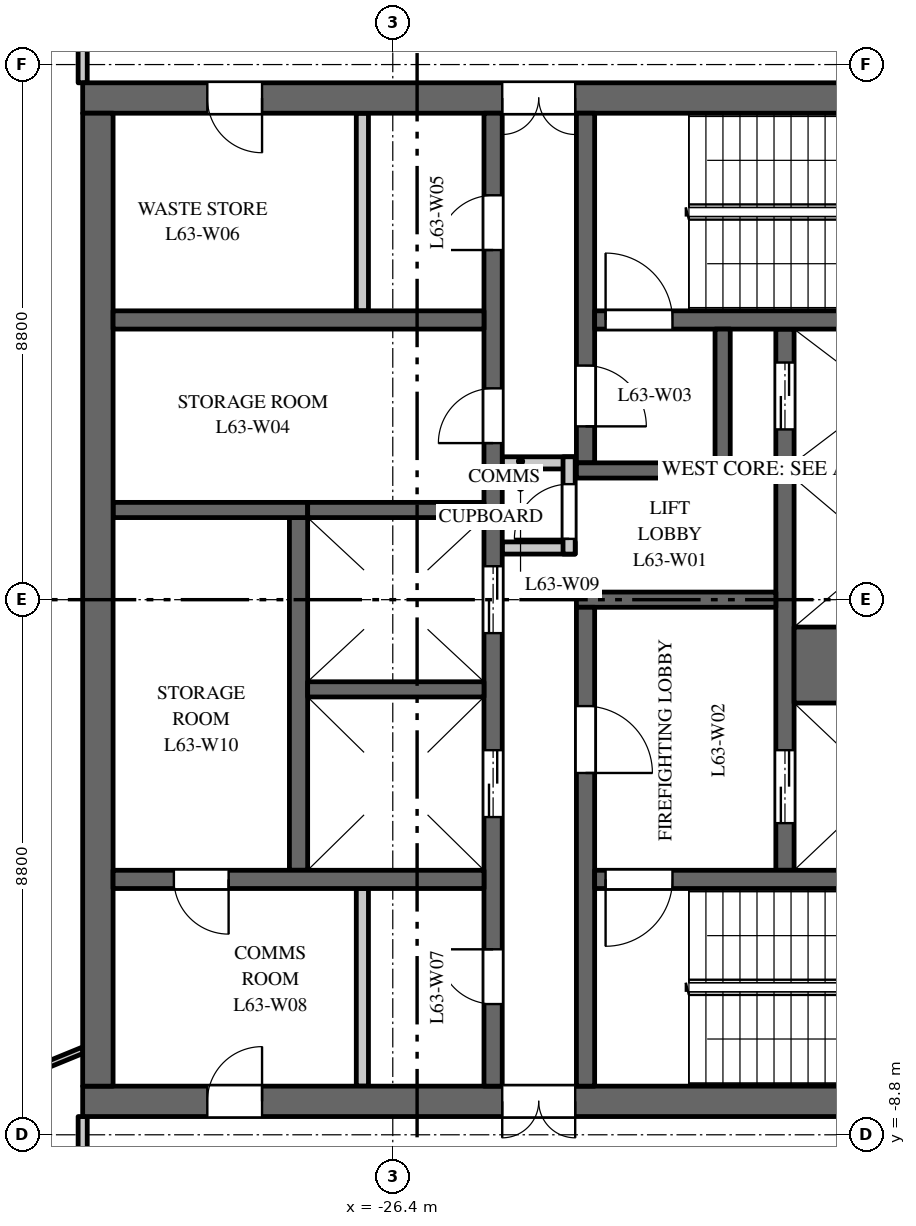
"""IFC4 building model, lengths in metres.
Left out: names, types, materials, properties, quantities, classifications, styles, units other than length and angle.
Written with IfcOpenShell. Run it as: python <this file> out.ifc"""

import sys

from ifc_helpers import new_model, si_unit, direction, frame, frame_2d, origin, place, context, subcontext, project, spatial, rectangle, extrude, element, fill, save


model = new_model("IFC4")
c1 = context("Model", 3, precision=1e-05, world=origin(), true_north=direction((0.0, 1.0)))
c2 = subcontext(c1, "Body", "Model", "MODEL_VIEW")
j1 = project(units=[si_unit("LENGTHUNIT", "METRE"), si_unit("PLANEANGLEUNIT", "RADIAN")], contexts=[c1])
p1 = place(None, origin())
s1 = spatial("IfcSite", under=j1, at=p1, CompositionType="ELEMENT")
p2 = place(p1, origin())
s2 = spatial("IfcBuilding", under=s1, at=p2, CompositionType="ELEMENT")
p3 = place(p2, frame((0.0, 0.0, 295.0)))
s3 = spatial("IfcBuildingStorey", under=s2, at=p3, CompositionType="ELEMENT", Elevation=295.0)
p4 = place(p3, frame((-16.5, 8.25, 0.0), z_axis=(0.0, 0.0, 1.0), x_axis=(-1.0, 0.0, 0.0)))
e1 = element("IfcWall", 1, at=p4, inside=s3, PredefinedType="SHEAR", context=c2, shape_type="SweptSolid", body=[
    extrude(rectangle(XDim=15.0, YDim=0.5, at=frame_2d((7.5, 0.0))), origin(), (0.0, 0.0, 1.0), 3.7),
])
p5 = place(p4, frame((6.9, 0.0, 0.0)))
e2 = element("IfcOpeningElement", 2, at=p5, cuts=e1, PredefinedType="OPENING", context=c2, shape_type="SweptSolid", body=[
    extrude(rectangle(XDim=1.2, YDim=2.1, at=frame_2d((0.6, 1.05))), frame((0.0, 0.26, 0.0), z_axis=(0.0, -1.0, 0.0), x_axis=(1.0, 0.0, 0.0)), (0.0, 0.0, 1.0), 0.52),
])
p6 = place(p4, frame((12.05, 0.0, 0.0)))
e3 = element("IfcOpeningElement", 3, at=p6, cuts=e1, PredefinedType="OPENING", context=c2, shape_type="SweptSolid", body=[
    extrude(rectangle(XDim=0.9, YDim=2.1, at=frame_2d((0.45, 1.05))), frame((0.0, 0.26, 0.0), z_axis=(0.0, -1.0, 0.0), x_axis=(1.0, 0.0, 0.0)), (0.0, 0.0, 1.0), 0.52),
])
p7 = place(p3, frame((-16.5, -8.25, 0.0), z_axis=(0.0, 0.0, 1.0), x_axis=(-1.0, 0.0, 0.0)))
e4 = element("IfcWall", 4, at=p7, inside=s3, PredefinedType="SHEAR", context=c2, shape_type="SweptSolid", body=[
    extrude(rectangle(XDim=15.0, YDim=0.5, at=frame_2d((7.5, 0.0))), origin(), (0.0, 0.0, 1.0), 3.7),
])
p8 = place(p7, frame((6.9, 0.0, 0.0)))
e5 = element("IfcOpeningElement", 5, at=p8, cuts=e4, PredefinedType="OPENING", context=c2, shape_type="SweptSolid", body=[
    extrude(rectangle(XDim=1.2, YDim=2.1, at=frame_2d((0.6, 1.05))), frame((0.0, 0.26, 0.0), z_axis=(0.0, -1.0, 0.0), x_axis=(1.0, 0.0, 0.0)), (0.0, 0.0, 1.0), 0.52),
])
p9 = place(p7, frame((12.05, 0.0, 0.0)))
e6 = element("IfcOpeningElement", 6, at=p9, cuts=e4, PredefinedType="OPENING", context=c2, shape_type="SweptSolid", body=[
    extrude(rectangle(XDim=0.9, YDim=2.1, at=frame_2d((0.45, 1.05))), frame((0.0, 0.26, 0.0), z_axis=(0.0, -1.0, 0.0), x_axis=(1.0, 0.0, 0.0)), (0.0, 0.0, 1.0), 0.52),
])
p10 = place(p3, frame((-27.95, -4.45, 0.0), z_axis=(0.0, 0.0, 1.0), x_axis=(0.0, 1.0, 0.0)))
e7 = element("IfcWall", 7, at=p10, inside=s3, PredefinedType="SHEAR", context=c2, shape_type="SweptSolid", body=[
    extrude(rectangle(XDim=5.8, YDim=0.3, at=frame_2d((2.9, 0.0))), origin(), (0.0, 0.0, 1.0), 3.7),
])
p11 = place(p3, frame((-27.8, 1.475, 0.0), z_axis=(0.0, 0.0, 1.0), x_axis=(-1.0, 0.0, 0.0)))
e8 = element("IfcWall", 8, at=p11, inside=s3, PredefinedType="SHEAR", context=c2, shape_type="SweptSolid", body=[
    extrude(rectangle(XDim=3.2, YDim=0.25, at=frame_2d((1.6, 0.0))), origin(), (0.0, 0.0, 1.0), 3.7),
])
p12 = place(p3, frame((-19.95, -4.45, 0.0), z_axis=(0.0, 0.0, 1.0), x_axis=(0.0, 1.0, 0.0)))
e9 = element("IfcWall", 9, at=p12, inside=s3, PredefinedType="SHEAR", context=c2, shape_type="SweptSolid", body=[
    extrude(rectangle(XDim=8.9, YDim=0.3, at=frame_2d((4.45, 0.0))), origin(), (0.0, 0.0, 1.0), 3.7),
])
p13 = place(p12, frame((0.775, 0.0, 0.0)))
e10 = element("IfcOpeningElement", 10, at=p13, cuts=e9, PredefinedType="OPENING", context=c2, shape_type="SweptSolid", body=[
    extrude(rectangle(XDim=1.2, YDim=2.1, at=frame_2d((0.6, 1.05))), frame((0.0, 0.16, 0.0), z_axis=(0.0, -1.0, 0.0), x_axis=(1.0, 0.0, 0.0)), (0.0, 0.0, 1.0), 0.32),
])
p14 = place(p12, frame((7.25, 0.0, 0.0)))
e11 = element("IfcOpeningElement", 11, at=p14, cuts=e9, PredefinedType="OPENING", context=c2, shape_type="SweptSolid", body=[
    extrude(rectangle(XDim=1.1, YDim=2.1, at=frame_2d((0.55, 1.05))), frame((0.0, 0.16, 0.0), z_axis=(0.0, -1.0, 0.0), x_axis=(1.0, 0.0, 0.0)), (0.0, 0.0, 1.0), 0.32),
])
p15 = place(p3, frame((-24.75, -8.0, 0.0), z_axis=(0.0, 0.0, 1.0), x_axis=(0.0, 1.0, 0.0)))
e12 = element("IfcWall", 12, at=p15, inside=s3, PredefinedType="SHEAR", context=c2, shape_type="SweptSolid", body=[
    extrude(rectangle(XDim=16.0, YDim=0.3, at=frame_2d((8.0, 0.0))), origin(), (0.0, 0.0, 1.0), 3.7),
])
p16 = place(p15, frame((4.425, 0.0, 0.0)))
e13 = element("IfcOpeningElement", 13, at=p16, cuts=e12, PredefinedType="OPENING", context=c2, shape_type="SweptSolid", body=[
    extrude(rectangle(XDim=1.1, YDim=2.1, at=frame_2d((0.55, 1.05))), frame((0.0, 0.16, 0.0), z_axis=(0.0, -1.0, 0.0), x_axis=(1.0, 0.0, 0.0)), (0.0, 0.0, 1.0), 0.32),
])
p17 = place(p15, frame((7.45, 0.0, 0.0)))
e14 = element("IfcOpeningElement", 14, at=p17, cuts=e12, PredefinedType="OPENING", context=c2, shape_type="SweptSolid", body=[
    extrude(rectangle(XDim=1.1, YDim=2.1, at=frame_2d((0.55, 1.05))), frame((0.0, 0.16, 0.0), z_axis=(0.0, -1.0, 0.0), x_axis=(1.0, 0.0, 0.0)), (0.0, 0.0, 1.0), 0.32),
])
p18 = place(p15, frame((10.575, 0.0, 0.0)))
e15 = element("IfcOpeningElement", 15, at=p18, cuts=e12, PredefinedType="OPENING", context=c2, shape_type="SweptSolid", body=[
    extrude(rectangle(XDim=0.9, YDim=2.1, at=frame_2d((0.45, 1.05))), frame((0.0, 0.16, 0.0), z_axis=(0.0, -1.0, 0.0), x_axis=(1.0, 0.0, 0.0)), (0.0, 0.0, 1.0), 0.32),
])
p19 = place(p15, frame((13.75, 0.0, 0.0)))
e16 = element("IfcOpeningElement", 16, at=p19, cuts=e12, PredefinedType="OPENING", context=c2, shape_type="SweptSolid", body=[
    extrude(rectangle(XDim=0.9, YDim=2.1, at=frame_2d((0.45, 1.05))), frame((0.0, 0.16, 0.0), z_axis=(0.0, -1.0, 0.0), x_axis=(1.0, 0.0, 0.0)), (0.0, 0.0, 1.0), 0.32),
])
p20 = place(p15, frame((1.35, 0.0, 0.0)))
e17 = element("IfcOpeningElement", 17, at=p20, cuts=e12, PredefinedType="OPENING", context=c2, shape_type="SweptSolid", body=[
    extrude(rectangle(XDim=0.9, YDim=2.1, at=frame_2d((0.45, 1.05))), frame((0.0, 0.16, 0.0), z_axis=(0.0, -1.0, 0.0), x_axis=(1.0, 0.0, 0.0)), (0.0, 0.0, 1.0), 0.32),
])
p21 = place(p3, frame((-20.1, 0.0, 0.0), z_axis=(0.0, 0.0, 1.0), x_axis=(-1.0, 0.0, 0.0)))
e18 = element("IfcWall", 18, at=p21, inside=s3, PredefinedType="SHEAR", context=c2, shape_type="SweptSolid", body=[
    extrude(rectangle(XDim=3.28, YDim=0.25, at=frame_2d((1.64, 0.0))), origin(), (0.0, 0.0, 1.0), 3.7),
])
for number, where, z_axis, x_axis in (
    (19, (-23.4, 0.85, 0.0), (0.0, 0.0, 1.0), (-1.0, 0.0, 0.0)),
    (20, (-23.4, 2.25, 0.0), (0.0, 0.0, 1.0), (-1.0, 0.0, 0.0)),
):
    element("IfcWall", number, at=place(p3, frame(where, z_axis=z_axis, x_axis=x_axis)), inside=s3, PredefinedType="PARTITIONING", context=c2, shape_type="SweptSolid", body=[
        extrude(rectangle(XDim=1.2, YDim=0.2, at=frame_2d((0.6, 0.0))), origin(), (0.0, 0.0, 1.0), 3.7),
    ])
p22 = place(p3, frame((-23.5, 0.75, 0.0), z_axis=(0.0, 0.0, 1.0), x_axis=(0.0, 1.0, 0.0)))
e21 = element("IfcWall", 21, at=p22, inside=s3, PredefinedType="PARTITIONING", context=c2, shape_type="SweptSolid", body=[
    extrude(rectangle(XDim=1.6, YDim=0.2, at=frame_2d((0.8, 0.0))), origin(), (0.0, 0.0, 1.0), 3.7),
])
p23 = place(p22, frame((0.25, 0.0, 0.0)))
e22 = element("IfcOpeningElement", 22, at=p23, cuts=e21, PredefinedType="OPENING", context=c2, shape_type="SweptSolid", body=[
    extrude(rectangle(XDim=0.9, YDim=2.1, at=frame_2d((0.45, 1.05))), frame((0.0, 0.11, 0.0), z_axis=(0.0, -1.0, 0.0), x_axis=(1.0, 0.0, 0.0)), (0.0, 0.0, 1.0), 0.22),
])
p24 = place(p3, frame((-31.25, -8.0, 0.0), z_axis=(0.0, 0.0, 1.0), x_axis=(0.0, 1.0, 0.0)))
e23 = element("IfcWall", 23, at=p24, inside=s3, PredefinedType="SHEAR", context=c2, shape_type="SweptSolid", body=[
    extrude(rectangle(XDim=16.0, YDim=0.5, at=frame_2d((8.0, 0.0))), origin(), (0.0, 0.0, 1.0), 3.7),
])
p25 = place(p3, frame((-24.9, 4.6, 0.0), z_axis=(0.0, 0.0, 1.0), x_axis=(-1.0, 0.0, 0.0)))
e24 = element("IfcWall", 24, at=p25, inside=s3, PredefinedType="SHEAR", context=c2, shape_type="SweptSolid", body=[
    extrude(rectangle(XDim=6.1, YDim=0.3, at=frame_2d((3.05, 0.0))), origin(), (0.0, 0.0, 1.0), 3.7),
])
for number, where, z_axis, x_axis in (
    (25, (-26.9, 4.75, 0.0), (0.0, 0.0, 1.0), (0.0, 1.0, 0.0)),
    (26, (-26.9, -8.0, 0.0), (0.0, 0.0, 1.0), (0.0, 1.0, 0.0)),
):
    element("IfcWall", number, at=place(p3, frame(where, z_axis=z_axis, x_axis=x_axis)), inside=s3, PredefinedType="PARTITIONING", context=c2, shape_type="SweptSolid", body=[
        extrude(rectangle(XDim=3.25, YDim=0.2, at=frame_2d((1.625, 0.0))), origin(), (0.0, 0.0, 1.0), 3.7),
    ])
p26 = place(p3, frame((-24.9, -4.6, 0.0), z_axis=(0.0, 0.0, 1.0), x_axis=(-1.0, 0.0, 0.0)))
e27 = element("IfcWall", 27, at=p26, inside=s3, PredefinedType="SHEAR", context=c2, shape_type="SweptSolid", body=[
    extrude(rectangle(XDim=6.1, YDim=0.3, at=frame_2d((3.05, 0.0))), origin(), (0.0, 0.0, 1.0), 3.7),
])
p27 = place(p26, frame((4.2, 0.0, 0.0)))
e28 = element("IfcOpeningElement", 28, at=p27, cuts=e27, PredefinedType="OPENING", context=c2, shape_type="SweptSolid", body=[
    extrude(rectangle(XDim=0.9, YDim=2.1, at=frame_2d((0.45, 1.05))), frame((0.0, 0.16, 0.0), z_axis=(0.0, -1.0, 0.0), x_axis=(1.0, 0.0, 0.0)), (0.0, 0.0, 1.0), 0.32),
])
p28 = place(p3, frame((-16.9, -1.075, 0.0), z_axis=(0.0, 0.0, 1.0), x_axis=(-1.0, 0.0, 0.0)))
e29 = element("IfcWall", 29, at=p28, inside=s3, PredefinedType="SHEAR", context=c2, shape_type="SweptSolid", body=[
    extrude(rectangle(XDim=2.9, YDim=1.25, at=frame_2d((1.45, 0.0))), origin(), (0.0, 0.0, 1.0), 3.7),
])
for number, where, z_axis, x_axis in (
    (30, (-16.9, 2.125, 0.0), (0.0, 0.0, 1.0), (-1.0, 0.0, 0.0)),
    (31, (-24.9, -1.475, 0.0), (0.0, 0.0, 1.0), (-1.0, 0.0, 0.0)),
    (32, (-24.9, 1.475, 0.0), (0.0, 0.0, 1.0), (-1.0, 0.0, 0.0)),
):
    element("IfcWall", number, at=place(p3, frame(where, z_axis=z_axis, x_axis=x_axis)), inside=s3, PredefinedType="SHEAR", context=c2, shape_type="SweptSolid", body=[
        extrude(rectangle(XDim=2.9, YDim=0.25, at=frame_2d((1.45, 0.0))), origin(), (0.0, 0.0, 1.0), 3.7),
    ])
p29 = place(p3, frame((-23.23, 2.25, 0.0), z_axis=(0.0, 0.0, 1.0), x_axis=(0.0, 1.0, 0.0)))
e33 = element("IfcWall", 33, at=p29, inside=s3, PredefinedType="SHEAR", context=c2, shape_type="SweptSolid", body=[
    extrude(rectangle(XDim=5.75, YDim=0.3, at=frame_2d((2.875, 0.0))), origin(), (0.0, 0.0, 1.0), 3.7),
])
p30 = place(p29, frame((0.6, 0.0, 0.0)))
e34 = element("IfcOpeningElement", 34, at=p30, cuts=e33, PredefinedType="OPENING", context=c2, shape_type="SweptSolid", body=[
    extrude(rectangle(XDim=1.0, YDim=2.1, at=frame_2d((0.5, 1.05))), frame((0.0, 0.16, 0.0), z_axis=(0.0, -1.0, 0.0), x_axis=(1.0, 0.0, 0.0)), (0.0, 0.0, 1.0), 0.32),
])
p31 = place(p3, frame((-23.23, -8.0, 0.0), z_axis=(0.0, 0.0, 1.0), x_axis=(0.0, 1.0, 0.0)))
e35 = element("IfcWall", 35, at=p31, inside=s3, PredefinedType="SHEAR", context=c2, shape_type="SweptSolid", body=[
    extrude(rectangle(XDim=7.875, YDim=0.3, at=frame_2d((3.938, 0.0))), origin(), (0.0, 0.0, 1.0), 3.7),
])
p32 = place(p31, frame((5.15, 0.0, 0.0)))
e36 = element("IfcOpeningElement", 36, at=p32, cuts=e35, PredefinedType="OPENING", context=c2, shape_type="SweptSolid", body=[
    extrude(rectangle(XDim=1.1, YDim=2.1, at=frame_2d((0.55, 1.05))), frame((0.0, 0.16, 0.0), z_axis=(0.0, -1.0, 0.0), x_axis=(1.0, 0.0, 0.0)), (0.0, 0.0, 1.0), 0.32),
])
p33 = place(p3, frame((-16.9, 4.6, 0.0), z_axis=(0.0, 0.0, 1.0), x_axis=(-1.0, 0.0, 0.0)))
e37 = element("IfcWall", 37, at=p33, inside=s3, PredefinedType="SHEAR", context=c2, shape_type="SweptSolid", body=[
    extrude(rectangle(XDim=6.18, YDim=0.3, at=frame_2d((3.09, 0.0))), origin(), (0.0, 0.0, 1.0), 3.7),
])
p34 = place(p33, frame((4.9, 0.0, 0.0)))
e38 = element("IfcOpeningElement", 38, at=p34, cuts=e37, PredefinedType="OPENING", context=c2, shape_type="SweptSolid", body=[
    extrude(rectangle(XDim=1.1, YDim=2.1, at=frame_2d((0.55, 1.05))), frame((0.0, 0.16, 0.0), z_axis=(0.0, -1.0, 0.0), x_axis=(1.0, 0.0, 0.0)), (0.0, 0.0, 1.0), 0.32),
])
p35 = place(p3, frame((-16.9, -4.6, 0.0), z_axis=(0.0, 0.0, 1.0), x_axis=(-1.0, 0.0, 0.0)))
e39 = element("IfcWall", 39, at=p35, inside=s3, PredefinedType="SHEAR", context=c2, shape_type="SweptSolid", body=[
    extrude(rectangle(XDim=6.18, YDim=0.3, at=frame_2d((3.09, 0.0))), origin(), (0.0, 0.0, 1.0), 3.7),
])
p36 = place(p35, frame((4.9, 0.0, 0.0)))
e40 = element("IfcOpeningElement", 40, at=p36, cuts=e39, PredefinedType="OPENING", context=c2, shape_type="SweptSolid", body=[
    extrude(rectangle(XDim=1.1, YDim=2.1, at=frame_2d((0.55, 1.05))), frame((0.0, 0.16, 0.0), z_axis=(0.0, -1.0, 0.0), x_axis=(1.0, 0.0, 0.0)), (0.0, 0.0, 1.0), 0.32),
])
p37 = place(p3, frame((-20.85, 2.125, 0.0), z_axis=(0.0, 0.0, 1.0), x_axis=(-1.0, 0.0, 0.0)))
e41 = element("IfcWall", 41, at=p37, inside=s3, PredefinedType="SHEAR", context=c2, shape_type="SweptSolid", body=[
    extrude(rectangle(XDim=2.53, YDim=0.25, at=frame_2d((1.265, 0.0))), origin(), (0.0, 0.0, 1.0), 3.7),
])
p38 = place(p3, frame((-20.975, 2.25, 0.0), z_axis=(0.0, 0.0, 1.0), x_axis=(0.0, 1.0, 0.0)))
e42 = element("IfcWall", 42, at=p38, inside=s3, PredefinedType="SHEAR", context=c2, shape_type="SweptSolid", body=[
    extrude(rectangle(XDim=2.2, YDim=0.25, at=frame_2d((1.1, 0.0))), origin(), (0.0, 0.0, 1.0), 3.7),
])
p39 = place(p3, frame((-34.234, -8.53, 0.0), z_axis=(0.0, 0.0, 1.0), x_axis=(0.925344112436, 0.379128307542, 0.0)))
e43 = element("IfcWall", 43, at=p39, inside=s3, PredefinedType="PARTITIONING", context=c2, shape_type="SweptSolid", body=[
    extrude(rectangle(XDim=2.954, YDim=0.1, at=frame_2d((1.477, 0.0))), origin(), (0.0, 0.0, 1.0), 3.0),
])
for number, where, z_axis, x_axis in (
    (44, (-31.5, -11.5, 0.0), (0.0, 0.0, 1.0), (0.0, 1.0, 0.0)),
    (45, (-31.5, 8.5, 0.0), (0.0, 0.0, 1.0), (0.0, 1.0, 0.0)),
):
    element("IfcWall", number, at=place(p3, frame(where, z_axis=z_axis, x_axis=x_axis)), inside=s3, PredefinedType="PARTITIONING", context=c2, shape_type="SweptSolid", body=[
        extrude(rectangle(XDim=3.0, YDim=0.15, at=frame_2d((1.5, 0.0))), origin(), (0.0, 0.0, 1.0), 3.0),
    ])
p40 = place(p13, origin())
e46 = element("IfcDoor", 46, at=p40, inside=s3, OperationType="DOUBLE_DOOR_SLIDING", PredefinedType="DOOR", context=c2, shape_type="SweptSolid", body=[
    extrude(rectangle(XDim=1.2, YDim=2.1, at=frame_2d((0.6, 1.05))), frame((0.0, 0.025, 0.0), z_axis=(0.0, -1.0, 0.0), x_axis=(1.0, 0.0, 0.0)), (0.0, 0.0, 1.0), 0.05),
])
fill(e10, e46)
p41 = place(p14, origin())
e47 = element("IfcDoor", 47, at=p41, inside=s3, OperationType="DOUBLE_DOOR_SLIDING", PredefinedType="DOOR", context=c2, shape_type="SweptSolid", body=[
    extrude(rectangle(XDim=1.1, YDim=2.1, at=frame_2d((0.55, 1.05))), frame((0.0, 0.025, 0.0), z_axis=(0.0, -1.0, 0.0), x_axis=(1.0, 0.0, 0.0)), (0.0, 0.0, 1.0), 0.05),
])
fill(e11, e47)
p42 = place(p16, origin())
e48 = element("IfcDoor", 48, at=p42, inside=s3, OperationType="DOUBLE_DOOR_SLIDING", PredefinedType="DOOR", context=c2, shape_type="SweptSolid", body=[
    extrude(rectangle(XDim=1.1, YDim=2.1, at=frame_2d((0.55, 1.05))), frame((0.0, 0.025, 0.0), z_axis=(0.0, -1.0, 0.0), x_axis=(1.0, 0.0, 0.0)), (0.0, 0.0, 1.0), 0.05),
])
fill(e13, e48)
p43 = place(p17, origin())
e49 = element("IfcDoor", 49, at=p43, inside=s3, OperationType="DOUBLE_DOOR_SLIDING", PredefinedType="DOOR", context=c2, shape_type="SweptSolid", body=[
    extrude(rectangle(XDim=1.1, YDim=2.1, at=frame_2d((0.55, 1.05))), frame((0.0, 0.025, 0.0), z_axis=(0.0, -1.0, 0.0), x_axis=(1.0, 0.0, 0.0)), (0.0, 0.0, 1.0), 0.05),
])
fill(e14, e49)
p44 = place(p34, origin())
e50 = element("IfcDoor", 50, at=p44, inside=s3, OperationType="SINGLE_SWING_RIGHT", PredefinedType="DOOR", context=c2, shape_type="SweptSolid", body=[
    extrude(rectangle(XDim=1.1, YDim=2.1, at=frame_2d((0.55, 1.05))), frame((0.0, 0.025, 0.0), z_axis=(0.0, -1.0, 0.0), x_axis=(1.0, 0.0, 0.0)), (0.0, 0.0, 1.0), 0.05),
])
fill(e38, e50)
p45 = place(p36, origin())
e51 = element("IfcDoor", 51, at=p45, inside=s3, OperationType="SINGLE_SWING_LEFT", PredefinedType="DOOR", context=c2, shape_type="SweptSolid", body=[
    extrude(rectangle(XDim=1.1, YDim=2.1, at=frame_2d((0.55, 1.05))), frame((0.0, 0.025, 0.0), z_axis=(0.0, -1.0, 0.0), x_axis=(1.0, 0.0, 0.0)), (0.0, 0.0, 1.0), 0.05),
])
fill(e40, e51)
p46 = place(p32, origin())
e52 = element("IfcDoor", 52, at=p46, inside=s3, OperationType="SINGLE_SWING_LEFT", PredefinedType="DOOR", context=c2, shape_type="SweptSolid", body=[
    extrude(rectangle(XDim=1.1, YDim=2.1, at=frame_2d((0.55, 1.05))), frame((0.0, 0.025, 0.0), z_axis=(0.0, -1.0, 0.0), x_axis=(1.0, 0.0, 0.0)), (0.0, 0.0, 1.0), 0.05),
])
fill(e36, e52)
p47 = place(p30, origin())
e53 = element("IfcDoor", 53, at=p47, inside=s3, OperationType="SINGLE_SWING_LEFT", PredefinedType="DOOR", context=c2, shape_type="SweptSolid", body=[
    extrude(rectangle(XDim=1.0, YDim=2.1, at=frame_2d((0.5, 1.05))), frame((0.0, 0.025, 0.0), z_axis=(0.0, -1.0, 0.0), x_axis=(1.0, 0.0, 0.0)), (0.0, 0.0, 1.0), 0.05),
])
fill(e34, e53)
p48 = place(p5, origin())
e54 = element("IfcDoor", 54, at=p48, inside=s3, OperationType="DOUBLE_DOOR_DOUBLE_SWING", PredefinedType="DOOR", context=c2, shape_type="SweptSolid", body=[
    extrude(rectangle(XDim=1.2, YDim=2.1, at=frame_2d((0.6, 1.05))), frame((0.0, 0.025, 0.0), z_axis=(0.0, -1.0, 0.0), x_axis=(1.0, 0.0, 0.0)), (0.0, 0.0, 1.0), 0.05),
])
fill(e2, e54)
p49 = place(p8, origin())
e55 = element("IfcDoor", 55, at=p49, inside=s3, OperationType="DOUBLE_DOOR_DOUBLE_SWING", PredefinedType="DOOR", context=c2, shape_type="SweptSolid", body=[
    extrude(rectangle(XDim=1.2, YDim=2.1, at=frame_2d((0.6, 1.05))), frame((0.0, 0.025, 0.0), z_axis=(0.0, -1.0, 0.0), x_axis=(1.0, 0.0, 0.0)), (0.0, 0.0, 1.0), 0.05),
])
fill(e5, e55)
p50 = place(p18, origin())
e56 = element("IfcDoor", 56, at=p50, inside=s3, OperationType="SINGLE_SWING_RIGHT", PredefinedType="DOOR", context=c2, shape_type="SweptSolid", body=[
    extrude(rectangle(XDim=0.9, YDim=2.1, at=frame_2d((0.45, 1.05))), frame((0.0, 0.025, 0.0), z_axis=(0.0, -1.0, 0.0), x_axis=(1.0, 0.0, 0.0)), (0.0, 0.0, 1.0), 0.05),
])
fill(e15, e56)
p51 = place(p19, origin())
e57 = element("IfcDoor", 57, at=p51, inside=s3, OperationType="SINGLE_SWING_RIGHT", PredefinedType="DOOR", context=c2, shape_type="SweptSolid", body=[
    extrude(rectangle(XDim=0.9, YDim=2.1, at=frame_2d((0.45, 1.05))), frame((0.0, 0.025, 0.0), z_axis=(0.0, -1.0, 0.0), x_axis=(1.0, 0.0, 0.0)), (0.0, 0.0, 1.0), 0.05),
])
fill(e16, e57)
p52 = place(p6, origin())
e58 = element("IfcDoor", 58, at=p52, inside=s3, OperationType="SINGLE_SWING_RIGHT", PredefinedType="DOOR", context=c2, shape_type="SweptSolid", body=[
    extrude(rectangle(XDim=0.9, YDim=2.1, at=frame_2d((0.45, 1.05))), frame((0.0, 0.025, 0.0), z_axis=(0.0, -1.0, 0.0), x_axis=(1.0, 0.0, 0.0)), (0.0, 0.0, 1.0), 0.05),
])
fill(e3, e58)
p53 = place(p20, origin())
e59 = element("IfcDoor", 59, at=p53, inside=s3, OperationType="SINGLE_SWING_LEFT", PredefinedType="DOOR", context=c2, shape_type="SweptSolid", body=[
    extrude(rectangle(XDim=0.9, YDim=2.1, at=frame_2d((0.45, 1.05))), frame((0.0, 0.025, 0.0), z_axis=(0.0, -1.0, 0.0), x_axis=(1.0, 0.0, 0.0)), (0.0, 0.0, 1.0), 0.05),
])
fill(e17, e59)
p54 = place(p9, origin())
e60 = element("IfcDoor", 60, at=p54, inside=s3, OperationType="SINGLE_SWING_LEFT", PredefinedType="DOOR", context=c2, shape_type="SweptSolid", body=[
    extrude(rectangle(XDim=0.9, YDim=2.1, at=frame_2d((0.45, 1.05))), frame((0.0, 0.025, 0.0), z_axis=(0.0, -1.0, 0.0), x_axis=(1.0, 0.0, 0.0)), (0.0, 0.0, 1.0), 0.05),
])
fill(e6, e60)
p55 = place(p23, origin())
e61 = element("IfcDoor", 61, at=p55, inside=s3, OperationType="SINGLE_SWING_RIGHT", PredefinedType="DOOR", context=c2, shape_type="SweptSolid", body=[
    extrude(rectangle(XDim=0.9, YDim=2.1, at=frame_2d((0.45, 1.05))), frame((0.0, 0.025, 0.0), z_axis=(0.0, -1.0, 0.0), x_axis=(1.0, 0.0, 0.0)), (0.0, 0.0, 1.0), 0.05),
])
fill(e22, e61)
p56 = place(p27, origin())
e62 = element("IfcDoor", 62, at=p56, inside=s3, OperationType="SINGLE_SWING_RIGHT", PredefinedType="DOOR", context=c2, shape_type="SweptSolid", body=[
    extrude(rectangle(XDim=0.9, YDim=2.1, at=frame_2d((0.45, 1.05))), frame((0.0, 0.025, 0.0), z_axis=(0.0, -1.0, 0.0), x_axis=(1.0, 0.0, 0.0)), (0.0, 0.0, 1.0), 0.05),
])
fill(e28, e62)
save(model, sys.argv[1])
